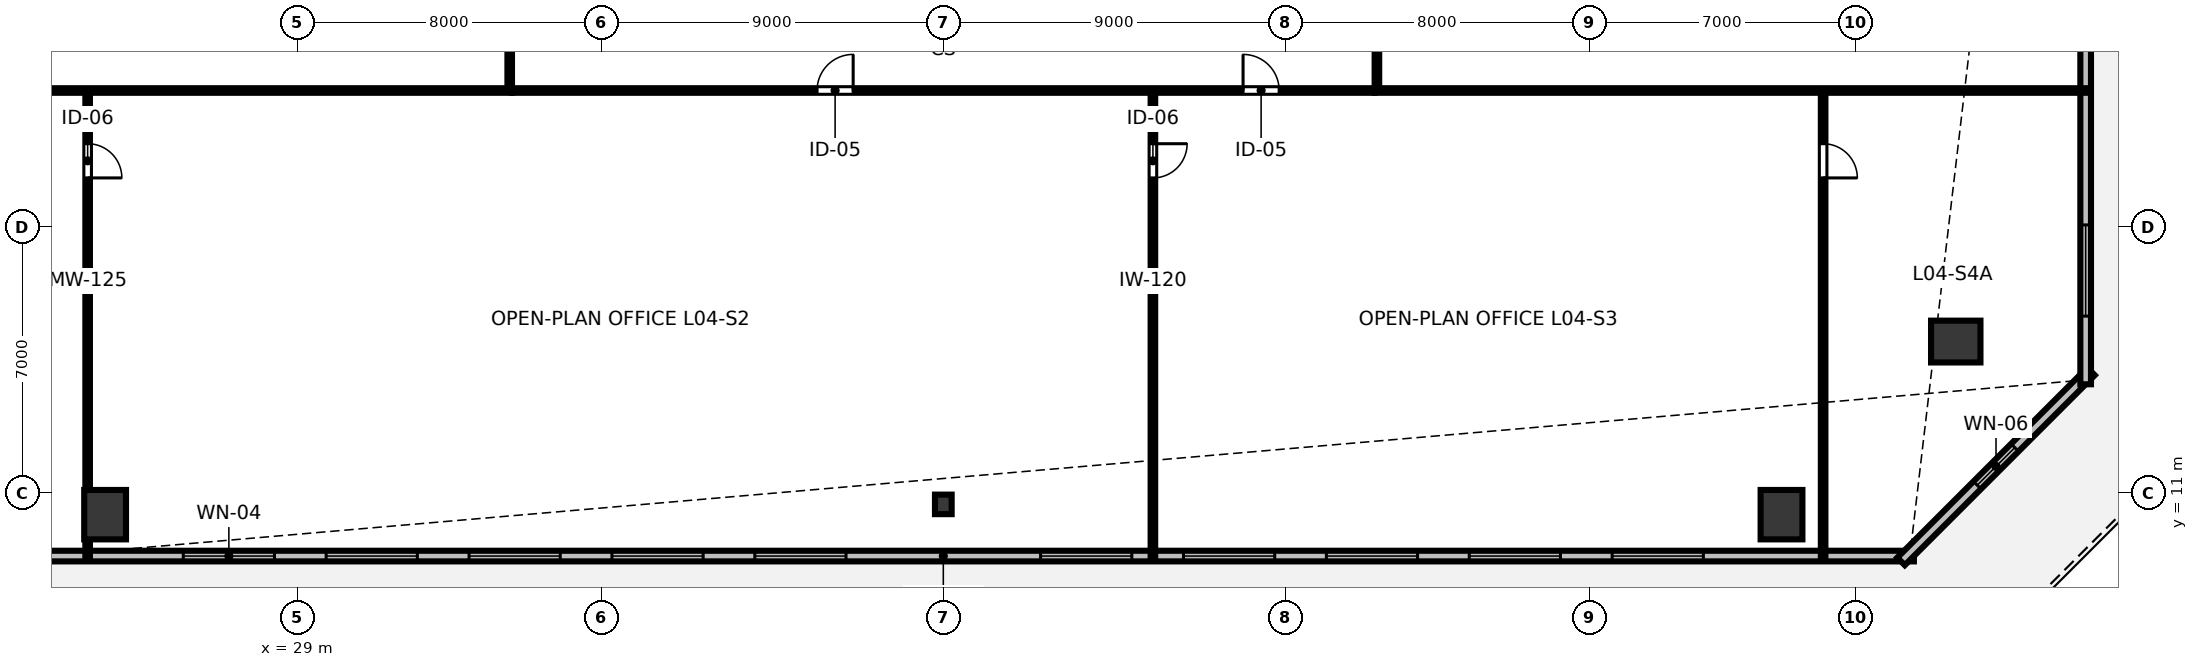
"""IFC4 building model, lengths in metres.
Left out: names, types, materials, properties, quantities, classifications, styles, units other than length and angle.
Written with IfcOpenShell. Run it as: python <this file> out.ifc"""

import sys

from ifc_helpers import new_model, si_unit, direction, frame, frame_2d, origin, origin_2d, place, context, subcontext, project, spatial, rectangle, hollow_rectangle, i_section, extrude, element, fill, save


model = new_model("IFC4")
c1 = context("Model", 3, precision=1e-05, world=origin(), true_north=direction((0.0, 1.0)))
c2 = subcontext(c1, "Body", "Model", "MODEL_VIEW")
j1 = project(units=[si_unit("LENGTHUNIT", "METRE"), si_unit("PLANEANGLEUNIT", "RADIAN")], contexts=[c1])
p1 = place(None, origin())
s1 = spatial("IfcSite", under=j1, at=p1, CompositionType="ELEMENT")
p2 = place(p1, origin())
s2 = spatial("IfcBuilding", under=s1, at=p2, CompositionType="ELEMENT")
p3 = place(p2, frame((0.0, 0.0, 18.5)))
s3 = spatial("IfcBuildingStorey", under=s2, at=p3, CompositionType="ELEMENT", Elevation=18.5)
p4 = place(p3, frame((23.943, 10.429, 0.0), z_axis=(0.0, 0.0, 1.0), x_axis=(1.0, 0.0, 0.0)))
e1 = element("IfcColumn", 1, at=p4, inside=s3, PredefinedType="COLUMN", context=c2, shape_type="SweptSolid", body=[
    extrude(hollow_rectangle(XDim=1.1, YDim=1.3, WallThickness=0.07, at=origin_2d()), origin(), (0.0, 0.0, 1.0), 4.048),
])
p5 = place(p3, frame((46.0, 10.7, 0.0), z_axis=(0.0, 0.0, 1.0), x_axis=(1.0, 0.0, 0.0)))
e2 = element("IfcColumn", 2, at=p5, inside=s3, PredefinedType="COLUMN", context=c2, shape_type="SweptSolid", body=[
    extrude(i_section(OverallWidth=0.439, OverallDepth=0.514, WebThickness=0.06, FlangeThickness=0.097, FilletRadius=0.025, at=origin_2d()), origin(), (0.0, 0.0, 1.0), 4.048),
])
for number, where, z_axis, x_axis in (
    (3, (68.057, 10.429, 0.0), (0.0, 0.0, 1.0), (1.0, 0.0, 0.0)),
    (4, (72.642, 14.984, 0.0), (0.0, 0.0, 1.0), (0.0, 1.0, 0.0)),
):
    element("IfcColumn", number, at=place(p3, frame(where, z_axis=z_axis, x_axis=x_axis)), inside=s3, PredefinedType="COLUMN", context=c2, shape_type="SweptSolid", body=[
        extrude(hollow_rectangle(XDim=1.1, YDim=1.3, WallThickness=0.07, at=origin_2d()), origin(), (0.0, 0.0, 1.0), 4.048),
    ])
p6 = place(p3, frame((20.46, 9.34, 0.0), z_axis=(0.0, 0.0, 1.0), x_axis=(1.0, 0.0, 0.0)))
e5 = element("IfcWall", 5, at=p6, inside=s3, PredefinedType="STANDARD", context=c2, shape_type="SweptSolid", body=[
    extrude(rectangle(XDim=51.08, YDim=0.28, at=frame_2d((25.54, 0.0))), origin(), (0.0, 0.0, 1.0), 4.05),
])
p7 = place(p6, frame((5.54, 0.0, 0.85)))
e6 = element("IfcOpeningElement", 6, at=p7, cuts=e5, PredefinedType="OPENING", context=c2, shape_type="SweptSolid", body=[
    extrude(rectangle(XDim=2.4, YDim=2.4, at=frame_2d((1.2, 1.2))), frame((0.0, 0.15, 0.0), z_axis=(0.0, -1.0, 0.0), x_axis=(1.0, 0.0, 0.0)), (0.0, 0.0, 1.0), 0.3),
])
p8 = place(p6, frame((9.3, 0.0, 0.85)))
e7 = element("IfcOpeningElement", 7, at=p8, cuts=e5, PredefinedType="OPENING", context=c2, shape_type="SweptSolid", body=[
    extrude(rectangle(XDim=2.4, YDim=2.4, at=frame_2d((1.2, 1.2))), frame((0.0, 0.15, 0.0), z_axis=(0.0, -1.0, 0.0), x_axis=(1.0, 0.0, 0.0)), (0.0, 0.0, 1.0), 0.3),
])
p9 = place(p6, frame((13.06, 0.0, 0.85)))
e8 = element("IfcOpeningElement", 8, at=p9, cuts=e5, PredefinedType="OPENING", context=c2, shape_type="SweptSolid", body=[
    extrude(rectangle(XDim=2.4, YDim=2.4, at=frame_2d((1.2, 1.2))), frame((0.0, 0.15, 0.0), z_axis=(0.0, -1.0, 0.0), x_axis=(1.0, 0.0, 0.0)), (0.0, 0.0, 1.0), 0.3),
])
p10 = place(p6, frame((16.82, 0.0, 0.85)))
e9 = element("IfcOpeningElement", 9, at=p10, cuts=e5, PredefinedType="OPENING", context=c2, shape_type="SweptSolid", body=[
    extrude(rectangle(XDim=2.4, YDim=2.4, at=frame_2d((1.2, 1.2))), frame((0.0, 0.15, 0.0), z_axis=(0.0, -1.0, 0.0), x_axis=(1.0, 0.0, 0.0)), (0.0, 0.0, 1.0), 0.3),
])
p11 = place(p6, frame((20.58, 0.0, 0.85)))
e10 = element("IfcOpeningElement", 10, at=p11, cuts=e5, PredefinedType="OPENING", context=c2, shape_type="SweptSolid", body=[
    extrude(rectangle(XDim=2.4, YDim=2.4, at=frame_2d((1.2, 1.2))), frame((0.0, 0.15, 0.0), z_axis=(0.0, -1.0, 0.0), x_axis=(1.0, 0.0, 0.0)), (0.0, 0.0, 1.0), 0.3),
])
p12 = place(p6, frame((28.1, 0.0, 0.85)))
e11 = element("IfcOpeningElement", 11, at=p12, cuts=e5, PredefinedType="OPENING", context=c2, shape_type="SweptSolid", body=[
    extrude(rectangle(XDim=2.4, YDim=2.4, at=frame_2d((1.2, 1.2))), frame((0.0, 0.15, 0.0), z_axis=(0.0, -1.0, 0.0), x_axis=(1.0, 0.0, 0.0)), (0.0, 0.0, 1.0), 0.3),
])
p13 = place(p6, frame((31.86, 0.0, 0.85)))
e12 = element("IfcOpeningElement", 12, at=p13, cuts=e5, PredefinedType="OPENING", context=c2, shape_type="SweptSolid", body=[
    extrude(rectangle(XDim=2.4, YDim=2.4, at=frame_2d((1.2, 1.2))), frame((0.0, 0.15, 0.0), z_axis=(0.0, -1.0, 0.0), x_axis=(1.0, 0.0, 0.0)), (0.0, 0.0, 1.0), 0.3),
])
p14 = place(p6, frame((35.62, 0.0, 0.85)))
e13 = element("IfcOpeningElement", 13, at=p14, cuts=e5, PredefinedType="OPENING", context=c2, shape_type="SweptSolid", body=[
    extrude(rectangle(XDim=2.4, YDim=2.4, at=frame_2d((1.2, 1.2))), frame((0.0, 0.15, 0.0), z_axis=(0.0, -1.0, 0.0), x_axis=(1.0, 0.0, 0.0)), (0.0, 0.0, 1.0), 0.3),
])
p15 = place(p6, frame((39.38, 0.0, 0.85)))
e14 = element("IfcOpeningElement", 14, at=p15, cuts=e5, PredefinedType="OPENING", context=c2, shape_type="SweptSolid", body=[
    extrude(rectangle(XDim=2.4, YDim=2.4, at=frame_2d((1.2, 1.2))), frame((0.0, 0.15, 0.0), z_axis=(0.0, -1.0, 0.0), x_axis=(1.0, 0.0, 0.0)), (0.0, 0.0, 1.0), 0.3),
])
p16 = place(p6, frame((43.14, 0.0, 0.85)))
e15 = element("IfcOpeningElement", 15, at=p16, cuts=e5, PredefinedType="OPENING", context=c2, shape_type="SweptSolid", body=[
    extrude(rectangle(XDim=2.4, YDim=2.4, at=frame_2d((1.2, 1.2))), frame((0.0, 0.15, 0.0), z_axis=(0.0, -1.0, 0.0), x_axis=(1.0, 0.0, 0.0)), (0.0, 0.0, 1.0), 0.3),
])
p17 = place(p3, frame((71.202, 9.2, 0.0), z_axis=(0.0, 0.0, 1.0), x_axis=(0.707106781187, 0.707106781187, 0.0)))
e16 = element("IfcWall", 16, at=p17, inside=s3, PredefinedType="STANDARD", context=c2, shape_type="SweptSolid", body=[
    extrude(rectangle(XDim=7.068, YDim=0.28, at=frame_2d((3.534, 0.0))), origin(), (0.0, 0.0, 1.0), 4.05),
])
p18 = place(p17, frame((2.834, 0.0, 1.5)))
e17 = element("IfcOpeningElement", 17, at=p18, cuts=e16, PredefinedType="OPENING", context=c2, shape_type="SweptSolid", body=[
    extrude(rectangle(XDim=1.4, YDim=1.2, at=frame_2d((0.7, 0.6))), frame((0.0, 0.15, 0.0), z_axis=(0.0, -1.0, 0.0), x_axis=(1.0, 0.0, 0.0)), (0.0, 0.0, 1.0), 0.3),
])
p19 = place(p3, frame((76.06, 13.86, 0.0), z_axis=(0.0, 0.0, 1.0), x_axis=(0.0, 1.0, 0.0)))
e18 = element("IfcWall", 18, at=p19, inside=s3, PredefinedType="STANDARD", context=c2, shape_type="SweptSolid", body=[
    extrude(rectangle(XDim=36.28, YDim=0.28, at=frame_2d((18.14, 0.0))), origin(), (0.0, 0.0, 1.0), 4.05),
])
p20 = place(p19, frame((22.54, 0.0, 0.0)))
e19 = element("IfcOpeningElement", 19, at=p20, cuts=e18, PredefinedType="OPENING", context=c2, shape_type="SweptSolid", body=[
    extrude(rectangle(XDim=1.6, YDim=2.15, at=frame_2d((0.8, 1.075))), frame((0.0, 0.15, 0.0), z_axis=(0.0, -1.0, 0.0), x_axis=(1.0, 0.0, 0.0)), (0.0, 0.0, 1.0), 0.3),
])
p21 = place(p19, frame((1.793, 0.0, 0.85)))
e20 = element("IfcOpeningElement", 20, at=p21, cuts=e18, PredefinedType="OPENING", context=c2, shape_type="SweptSolid", body=[
    extrude(rectangle(XDim=2.4, YDim=2.4, at=frame_2d((1.2, 1.2))), frame((0.0, 0.15, 0.0), z_axis=(0.0, -1.0, 0.0), x_axis=(1.0, 0.0, 0.0)), (0.0, 0.0, 1.0), 0.3),
])
p22 = place(p19, frame((9.367, 0.0, 0.85)))
e21 = element("IfcOpeningElement", 21, at=p22, cuts=e18, PredefinedType="OPENING", context=c2, shape_type="SweptSolid", body=[
    extrude(rectangle(XDim=2.4, YDim=2.4, at=frame_2d((1.2, 1.2))), frame((0.0, 0.15, 0.0), z_axis=(0.0, -1.0, 0.0), x_axis=(1.0, 0.0, 0.0)), (0.0, 0.0, 1.0), 0.3),
])
p23 = place(p19, frame((13.153, 0.0, 0.85)))
e22 = element("IfcOpeningElement", 22, at=p23, cuts=e18, PredefinedType="OPENING", context=c2, shape_type="SweptSolid", body=[
    extrude(rectangle(XDim=2.4, YDim=2.4, at=frame_2d((1.2, 1.2))), frame((0.0, 0.15, 0.0), z_axis=(0.0, -1.0, 0.0), x_axis=(1.0, 0.0, 0.0)), (0.0, 0.0, 1.0), 0.3),
])
p24 = place(p19, frame((16.94, 0.0, 0.85)))
e23 = element("IfcOpeningElement", 23, at=p24, cuts=e18, PredefinedType="OPENING", context=c2, shape_type="SweptSolid", body=[
    extrude(rectangle(XDim=2.4, YDim=2.4, at=frame_2d((1.2, 1.2))), frame((0.0, 0.15, 0.0), z_axis=(0.0, -1.0, 0.0), x_axis=(1.0, 0.0, 0.0)), (0.0, 0.0, 1.0), 0.3),
])
p25 = place(p19, frame((32.087, 0.0, 0.85)))
e24 = element("IfcOpeningElement", 24, at=p25, cuts=e18, PredefinedType="OPENING", context=c2, shape_type="SweptSolid", body=[
    extrude(rectangle(XDim=2.4, YDim=2.4, at=frame_2d((1.2, 1.2))), frame((0.0, 0.15, 0.0), z_axis=(0.0, -1.0, 0.0), x_axis=(1.0, 0.0, 0.0)), (0.0, 0.0, 1.0), 0.3),
])
p26 = place(p3, frame((23.484, 21.59, 0.0), z_axis=(0.0, 0.0, 1.0), x_axis=(0.0, -1.0, 0.0)))
e25 = element("IfcWall", 25, at=p26, inside=s3, PredefinedType="MOVABLE", context=c2, shape_type="SweptSolid", body=[
    extrude(rectangle(XDim=12.25, YDim=0.12, at=frame_2d((6.125, 0.0))), origin(), (0.0, 0.0, 1.0), 2.89),
])
p27 = place(p26, frame((1.4, 0.0, 0.0)))
e26 = element("IfcOpeningElement", 26, at=p27, cuts=e25, PredefinedType="OPENING", context=c2, shape_type="SweptSolid", body=[
    extrude(rectangle(XDim=0.9, YDim=2.15, at=frame_2d((0.45, 1.075))), frame((0.0, 0.07, 0.0), z_axis=(0.0, -1.0, 0.0), x_axis=(1.0, 0.0, 0.0)), (0.0, 0.0, 1.0), 0.14),
])
p28 = place(p3, frame((51.515, 21.59, 0.0), z_axis=(0.0, 0.0, 1.0), x_axis=(0.0, -1.0, 0.0)))
e27 = element("IfcWall", 27, at=p28, inside=s3, PredefinedType="PARTITIONING", context=c2, shape_type="SweptSolid", body=[
    extrude(rectangle(XDim=12.25, YDim=0.12, at=frame_2d((6.125, 0.0))), origin(), (0.0, 0.0, 1.0), 2.89),
])
p29 = place(p28, frame((1.4, 0.0, 0.0)))
e28 = element("IfcOpeningElement", 28, at=p29, cuts=e27, PredefinedType="OPENING", context=c2, shape_type="SweptSolid", body=[
    extrude(rectangle(XDim=0.9, YDim=2.15, at=frame_2d((0.45, 1.075))), frame((0.0, 0.07, 0.0), z_axis=(0.0, -1.0, 0.0), x_axis=(1.0, 0.0, 0.0)), (0.0, 0.0, 1.0), 0.14),
])
p30 = place(p3, frame((69.151, 21.59, 0.0), z_axis=(0.0, 0.0, 1.0), x_axis=(0.0, -1.0, 0.0)))
e29 = element("IfcWall", 29, at=p30, inside=s3, PredefinedType="PARTITIONING", context=c2, shape_type="SweptSolid", body=[
    extrude(rectangle(XDim=12.25, YDim=0.12, at=frame_2d((6.125, 0.0))), origin(), (0.0, 0.0, 1.0), 2.89),
])
p31 = place(p30, frame((1.4, 0.0, 0.0)))
e30 = element("IfcOpeningElement", 30, at=p31, cuts=e29, PredefinedType="OPENING", context=c2, shape_type="SweptSolid", body=[
    extrude(rectangle(XDim=0.9, YDim=2.15, at=frame_2d((0.45, 1.075))), frame((0.0, 0.07, 0.0), z_axis=(0.0, -1.0, 0.0), x_axis=(1.0, 0.0, 0.0)), (0.0, 0.0, 1.0), 0.14),
])
p32 = place(p3, frame((34.65, 21.59, 0.0), z_axis=(0.0, 0.0, 1.0), x_axis=(1.0, 0.0, 0.0)))
e31 = element("IfcWall", 31, at=p32, inside=s3, PredefinedType="PARTITIONING", context=c2, shape_type="SweptSolid", body=[
    extrude(rectangle(XDim=22.7, YDim=0.12, at=frame_2d((11.35, 0.0))), origin(), (0.0, 0.0, 1.0), 2.89),
])
p33 = place(p32, frame((8.028, 0.0, 0.0)))
e32 = element("IfcOpeningElement", 32, at=p33, cuts=e31, PredefinedType="OPENING", context=c2, shape_type="SweptSolid", body=[
    extrude(rectangle(XDim=0.95, YDim=2.15, at=frame_2d((0.475, 1.075))), frame((0.0, 0.07, 0.0), z_axis=(0.0, -1.0, 0.0), x_axis=(1.0, 0.0, 0.0)), (0.0, 0.0, 1.0), 0.14),
])
p34 = place(p32, frame((19.238, 0.0, 0.0)))
e33 = element("IfcOpeningElement", 33, at=p34, cuts=e31, PredefinedType="OPENING", context=c2, shape_type="SweptSolid", body=[
    extrude(rectangle(XDim=0.95, YDim=2.15, at=frame_2d((0.475, 1.075))), frame((0.0, 0.07, 0.0), z_axis=(0.0, -1.0, 0.0), x_axis=(1.0, 0.0, 0.0)), (0.0, 0.0, 1.0), 0.14),
])
p35 = place(p3, frame((34.59, 21.65, 0.0), z_axis=(0.0, 0.0, 1.0), x_axis=(0.0, 1.0, 0.0)))
e34 = element("IfcWall", 34, at=p35, inside=s3, PredefinedType="PARTITIONING", context=c2, shape_type="SweptSolid", body=[
    extrude(rectangle(XDim=20.7, YDim=0.12, at=frame_2d((10.35, 0.0))), origin(), (0.0, 0.0, 1.0), 2.89),
])
p36 = place(p35, frame((2.105, 0.0, 0.0)))
e35 = element("IfcOpeningElement", 35, at=p36, cuts=e34, PredefinedType="OPENING", context=c2, shape_type="SweptSolid", body=[
    extrude(rectangle(XDim=0.95, YDim=2.15, at=frame_2d((0.475, 1.075))), frame((0.0, 0.07, 0.0), z_axis=(0.0, -1.0, 0.0), x_axis=(1.0, 0.0, 0.0)), (0.0, 0.0, 1.0), 0.14),
])
p37 = place(p35, frame((7.369, 0.0, 0.0)))
e36 = element("IfcOpeningElement", 36, at=p37, cuts=e34, PredefinedType="OPENING", context=c2, shape_type="SweptSolid", body=[
    extrude(rectangle(XDim=0.95, YDim=2.15, at=frame_2d((0.475, 1.075))), frame((0.0, 0.07, 0.0), z_axis=(0.0, -1.0, 0.0), x_axis=(1.0, 0.0, 0.0)), (0.0, 0.0, 1.0), 0.14),
])
p38 = place(p35, frame((15.139, 0.0, 0.0)))
e37 = element("IfcOpeningElement", 37, at=p38, cuts=e34, PredefinedType="OPENING", context=c2, shape_type="SweptSolid", body=[
    extrude(rectangle(XDim=0.95, YDim=2.15, at=frame_2d((0.475, 1.075))), frame((0.0, 0.07, 0.0), z_axis=(0.0, -1.0, 0.0), x_axis=(1.0, 0.0, 0.0)), (0.0, 0.0, 1.0), 0.14),
])
p39 = place(p3, frame((57.41, 21.65, 0.0), z_axis=(0.0, 0.0, 1.0), x_axis=(0.0, 1.0, 0.0)))
e38 = element("IfcWall", 38, at=p39, inside=s3, PredefinedType="PARTITIONING", context=c2, shape_type="SweptSolid", body=[
    extrude(rectangle(XDim=20.7, YDim=0.12, at=frame_2d((10.35, 0.0))), origin(), (0.0, 0.0, 1.0), 2.89),
])
p40 = place(p39, frame((9.875, 0.0, 0.0)))
e39 = element("IfcOpeningElement", 39, at=p40, cuts=e38, PredefinedType="OPENING", context=c2, shape_type="SweptSolid", body=[
    extrude(rectangle(XDim=0.95, YDim=2.15, at=frame_2d((0.475, 1.075))), frame((0.0, 0.07, 0.0), z_axis=(0.0, -1.0, 0.0), x_axis=(1.0, 0.0, 0.0)), (0.0, 0.0, 1.0), 0.14),
])
for number, where, z_axis, x_axis in (
    (40, (34.65, 21.59, 0.0), (0.0, 0.0, 1.0), (-1.0, 0.0, 0.0)),
    (41, (57.35, 21.59, 0.0), (0.0, 0.0, 1.0), (1.0, 0.0, 0.0)),
):
    element("IfcWall", number, at=place(p3, frame(where, z_axis=z_axis, x_axis=x_axis)), inside=s3, PredefinedType="PARTITIONING", context=c2, shape_type="SweptSolid", body=[
        extrude(rectangle(XDim=18.71, YDim=0.12, at=frame_2d((9.355, 0.0))), origin(), (0.0, 0.0, 1.0), 2.89),
    ])
p41 = place(p7, origin())
e42 = element("IfcWindow", 42, at=p41, inside=s3, PartitioningType="SINGLE_PANEL", PredefinedType="WINDOW", context=c2, shape_type="SweptSolid", body=[
    extrude(rectangle(XDim=2.4, YDim=2.4, at=frame_2d((1.2, 1.2))), frame((0.0, 0.03, 0.0), z_axis=(0.0, -1.0, 0.0), x_axis=(1.0, 0.0, 0.0)), (0.0, 0.0, 1.0), 0.06),
])
fill(e6, e42)
p42 = place(p8, origin())
e43 = element("IfcWindow", 43, at=p42, inside=s3, PartitioningType="SINGLE_PANEL", PredefinedType="WINDOW", context=c2, shape_type="SweptSolid", body=[
    extrude(rectangle(XDim=2.4, YDim=2.4, at=frame_2d((1.2, 1.2))), frame((0.0, 0.03, 0.0), z_axis=(0.0, -1.0, 0.0), x_axis=(1.0, 0.0, 0.0)), (0.0, 0.0, 1.0), 0.06),
])
fill(e7, e43)
p43 = place(p9, origin())
e44 = element("IfcWindow", 44, at=p43, inside=s3, PartitioningType="SINGLE_PANEL", PredefinedType="WINDOW", context=c2, shape_type="SweptSolid", body=[
    extrude(rectangle(XDim=2.4, YDim=2.4, at=frame_2d((1.2, 1.2))), frame((0.0, 0.03, 0.0), z_axis=(0.0, -1.0, 0.0), x_axis=(1.0, 0.0, 0.0)), (0.0, 0.0, 1.0), 0.06),
])
fill(e8, e44)
p44 = place(p10, origin())
e45 = element("IfcWindow", 45, at=p44, inside=s3, PartitioningType="SINGLE_PANEL", PredefinedType="WINDOW", context=c2, shape_type="SweptSolid", body=[
    extrude(rectangle(XDim=2.4, YDim=2.4, at=frame_2d((1.2, 1.2))), frame((0.0, 0.03, 0.0), z_axis=(0.0, -1.0, 0.0), x_axis=(1.0, 0.0, 0.0)), (0.0, 0.0, 1.0), 0.06),
])
fill(e9, e45)
p45 = place(p11, origin())
e46 = element("IfcWindow", 46, at=p45, inside=s3, PartitioningType="SINGLE_PANEL", PredefinedType="WINDOW", context=c2, shape_type="SweptSolid", body=[
    extrude(rectangle(XDim=2.4, YDim=2.4, at=frame_2d((1.2, 1.2))), frame((0.0, 0.03, 0.0), z_axis=(0.0, -1.0, 0.0), x_axis=(1.0, 0.0, 0.0)), (0.0, 0.0, 1.0), 0.06),
])
fill(e10, e46)
p46 = place(p12, origin())
e47 = element("IfcWindow", 47, at=p46, inside=s3, PartitioningType="SINGLE_PANEL", PredefinedType="WINDOW", context=c2, shape_type="SweptSolid", body=[
    extrude(rectangle(XDim=2.4, YDim=2.4, at=frame_2d((1.2, 1.2))), frame((0.0, 0.03, 0.0), z_axis=(0.0, -1.0, 0.0), x_axis=(1.0, 0.0, 0.0)), (0.0, 0.0, 1.0), 0.06),
])
fill(e11, e47)
p47 = place(p13, origin())
e48 = element("IfcWindow", 48, at=p47, inside=s3, PartitioningType="SINGLE_PANEL", PredefinedType="WINDOW", context=c2, shape_type="SweptSolid", body=[
    extrude(rectangle(XDim=2.4, YDim=2.4, at=frame_2d((1.2, 1.2))), frame((0.0, 0.03, 0.0), z_axis=(0.0, -1.0, 0.0), x_axis=(1.0, 0.0, 0.0)), (0.0, 0.0, 1.0), 0.06),
])
fill(e12, e48)
p48 = place(p14, origin())
e49 = element("IfcWindow", 49, at=p48, inside=s3, PartitioningType="SINGLE_PANEL", PredefinedType="WINDOW", context=c2, shape_type="SweptSolid", body=[
    extrude(rectangle(XDim=2.4, YDim=2.4, at=frame_2d((1.2, 1.2))), frame((0.0, 0.03, 0.0), z_axis=(0.0, -1.0, 0.0), x_axis=(1.0, 0.0, 0.0)), (0.0, 0.0, 1.0), 0.06),
])
fill(e13, e49)
p49 = place(p15, origin())
e50 = element("IfcWindow", 50, at=p49, inside=s3, PartitioningType="SINGLE_PANEL", PredefinedType="WINDOW", context=c2, shape_type="SweptSolid", body=[
    extrude(rectangle(XDim=2.4, YDim=2.4, at=frame_2d((1.2, 1.2))), frame((0.0, 0.03, 0.0), z_axis=(0.0, -1.0, 0.0), x_axis=(1.0, 0.0, 0.0)), (0.0, 0.0, 1.0), 0.06),
])
fill(e14, e50)
p50 = place(p16, origin())
e51 = element("IfcWindow", 51, at=p50, inside=s3, PartitioningType="SINGLE_PANEL", PredefinedType="WINDOW", context=c2, shape_type="SweptSolid", body=[
    extrude(rectangle(XDim=2.4, YDim=2.4, at=frame_2d((1.2, 1.2))), frame((0.0, 0.03, 0.0), z_axis=(0.0, -1.0, 0.0), x_axis=(1.0, 0.0, 0.0)), (0.0, 0.0, 1.0), 0.06),
])
fill(e15, e51)
p51 = place(p18, origin())
e52 = element("IfcWindow", 52, at=p51, inside=s3, PartitioningType="SINGLE_PANEL", PredefinedType="WINDOW", context=c2, shape_type="SweptSolid", body=[
    extrude(rectangle(XDim=1.4, YDim=1.2, at=frame_2d((0.7, 0.6))), frame((0.0, 0.03, 0.0), z_axis=(0.0, -1.0, 0.0), x_axis=(1.0, 0.0, 0.0)), (0.0, 0.0, 1.0), 0.06),
])
fill(e17, e52)
p52 = place(p21, origin())
e53 = element("IfcWindow", 53, at=p52, inside=s3, PartitioningType="SINGLE_PANEL", PredefinedType="WINDOW", context=c2, shape_type="SweptSolid", body=[
    extrude(rectangle(XDim=2.4, YDim=2.4, at=frame_2d((1.2, 1.2))), frame((0.0, 0.03, 0.0), z_axis=(0.0, -1.0, 0.0), x_axis=(1.0, 0.0, 0.0)), (0.0, 0.0, 1.0), 0.06),
])
fill(e20, e53)
p53 = place(p27, origin())
e54 = element("IfcDoor", 54, at=p53, inside=s3, OperationType="SINGLE_SWING_RIGHT", PredefinedType="DOOR", context=c2, shape_type="SweptSolid", body=[
    extrude(rectangle(XDim=0.9, YDim=2.15, at=frame_2d((0.45, 1.075))), frame((0.0, 0.025, 0.0), z_axis=(0.0, -1.0, 0.0), x_axis=(1.0, 0.0, 0.0)), (0.0, 0.0, 1.0), 0.05),
])
fill(e26, e54)
p54 = place(p29, origin())
e55 = element("IfcDoor", 55, at=p54, inside=s3, OperationType="SINGLE_SWING_LEFT", PredefinedType="DOOR", context=c2, shape_type="SweptSolid", body=[
    extrude(rectangle(XDim=0.9, YDim=2.15, at=frame_2d((0.45, 1.075))), frame((0.0, 0.025, 0.0), z_axis=(0.0, -1.0, 0.0), x_axis=(1.0, 0.0, 0.0)), (0.0, 0.0, 1.0), 0.05),
])
fill(e28, e55)
p55 = place(p31, origin())
e56 = element("IfcDoor", 56, at=p55, inside=s3, OperationType="SINGLE_SWING_RIGHT", PredefinedType="DOOR", context=c2, shape_type="SweptSolid", body=[
    extrude(rectangle(XDim=0.9, YDim=2.15, at=frame_2d((0.45, 1.075))), frame((0.0, 0.025, 0.0), z_axis=(0.0, -1.0, 0.0), x_axis=(1.0, 0.0, 0.0)), (0.0, 0.0, 1.0), 0.05),
])
fill(e30, e56)
p56 = place(p33, origin())
e57 = element("IfcDoor", 57, at=p56, inside=s3, OperationType="SINGLE_SWING_RIGHT", PredefinedType="DOOR", context=c2, shape_type="SweptSolid", body=[
    extrude(rectangle(XDim=0.95, YDim=2.15, at=frame_2d((0.475, 1.075))), frame((0.0, 0.025, 0.0), z_axis=(0.0, -1.0, 0.0), x_axis=(1.0, 0.0, 0.0)), (0.0, 0.0, 1.0), 0.05),
])
fill(e32, e57)
p57 = place(p34, origin())
e58 = element("IfcDoor", 58, at=p57, inside=s3, OperationType="SINGLE_SWING_LEFT", PredefinedType="DOOR", context=c2, shape_type="SweptSolid", body=[
    extrude(rectangle(XDim=0.95, YDim=2.15, at=frame_2d((0.475, 1.075))), frame((0.0, 0.025, 0.0), z_axis=(0.0, -1.0, 0.0), x_axis=(1.0, 0.0, 0.0)), (0.0, 0.0, 1.0), 0.05),
])
fill(e33, e58)
save(model, sys.argv[1])
